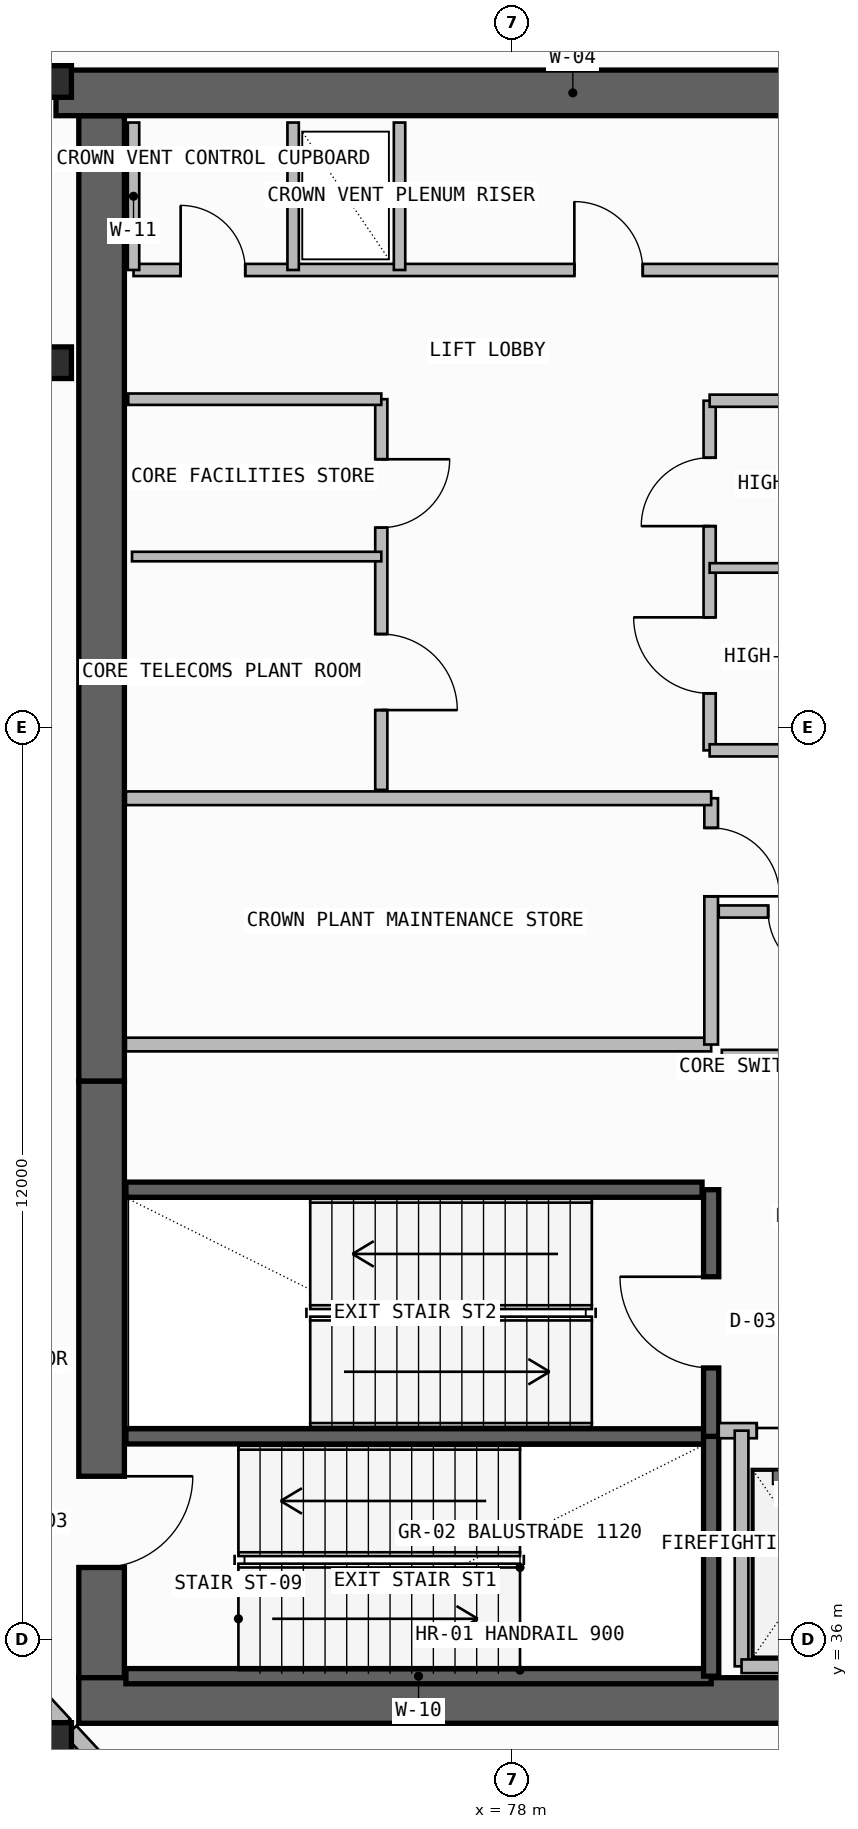
"""IFC4 building model, lengths in metres.
Left out: names, types, materials, properties, quantities, classifications, styles, units other than length and angle.
Written with IfcOpenShell. Run it as: python <this file> out.ifc"""

import sys

from ifc_helpers import new_model, si_unit, direction, frame, frame_2d, origin, origin_2d, place, context, subcontext, project, spatial, rectangle, i_section, extrude, element, fill, save


model = new_model("IFC4")
c1 = context("Model", 3, precision=1e-05, world=origin(), true_north=direction((0.0, 1.0)))
c2 = subcontext(c1, "Body", "Model", "MODEL_VIEW")
j1 = project(units=[si_unit("LENGTHUNIT", "METRE"), si_unit("PLANEANGLEUNIT", "RADIAN")], contexts=[c1])
p1 = place(None, origin())
s1 = spatial("IfcSite", under=j1, at=p1, CompositionType="ELEMENT")
p2 = place(p1, origin())
s2 = spatial("IfcBuilding", under=s1, at=p2, CompositionType="ELEMENT")
p3 = place(p2, frame((0.0, 0.0, 307.78)))
s3 = spatial("IfcBuildingStorey", under=s2, at=p3, CompositionType="ELEMENT", Elevation=307.78)
p4 = place(p3, frame((72.6, 35.5, -0.2), z_axis=(0.0, 0.0, 1.0), x_axis=(0.0, 1.0, 0.0)))
e1 = element("IfcWall", 1, at=p4, inside=s3, PredefinedType="SHEAR", context=c2, shape_type="SweptSolid", body=[
    extrude(rectangle(XDim=7.85, YDim=0.6, at=frame_2d((3.925, 0.0))), origin(), (0.0, 0.0, 1.0), 4.8),
])
p5 = place(p4, frame((1.45, 0.0, 0.2)))
e2 = element("IfcOpeningElement", 2, at=p5, cuts=e1, PredefinedType="OPENING", context=c2, shape_type="SweptSolid", body=[
    extrude(rectangle(XDim=1.2, YDim=2.2, at=frame_2d((0.6, 1.1))), frame((0.0, 0.31, 0.0), z_axis=(0.0, -1.0, 0.0), x_axis=(1.0, 0.0, 0.0)), (0.0, 0.0, 1.0), 0.62),
])
p6 = place(p3, frame((72.3, 35.2, -0.2), z_axis=(0.0, 0.0, 1.0), x_axis=(1.0, 0.0, 0.0)))
e3 = element("IfcWall", 3, at=p6, inside=s3, PredefinedType="SHEAR", context=c2, shape_type="SweptSolid", body=[
    extrude(rectangle(XDim=13.3, YDim=0.6, at=frame_2d((6.65, 0.0))), origin(), (0.0, 0.0, 1.0), 4.8),
])
p7 = place(p3, frame((72.6, 43.35, -0.2), z_axis=(0.0, 0.0, 1.0), x_axis=(0.0, 1.0, 0.0)))
e4 = element("IfcWall", 4, at=p7, inside=s3, PredefinedType="SHEAR", context=c2, shape_type="SweptSolid", body=[
    extrude(rectangle(XDim=12.7, YDim=0.6, at=frame_2d((6.35, 0.0))), origin(), (0.0, 0.0, 1.0), 4.8),
])
p8 = place(p3, frame((72.0, 56.35, -0.2), z_axis=(0.0, 0.0, 1.0), x_axis=(1.0, 0.0, 0.0)))
e5 = element("IfcWall", 5, at=p8, inside=s3, PredefinedType="SHEAR", context=c2, shape_type="SweptSolid", body=[
    extrude(rectangle(XDim=13.6, YDim=0.6, at=frame_2d((6.8, 0.0))), origin(), (0.0, 0.0, 1.0), 4.8),
])
for number, where, z_axis, x_axis in (
    (6, (72.0, 34.7, 0.0), (0.0, 0.0, 1.0), (1.0, 0.0, 0.0)),
    (7, (72.0, 52.8, 0.0), (0.0, 0.0, 1.0), (1.0, 0.0, 0.0)),
    (8, (72.0, 56.5, 0.0), (0.0, 0.0, 1.0), (1.0, 0.0, 0.0)),
):
    element("IfcColumn", number, at=place(p3, frame(where, z_axis=z_axis, x_axis=x_axis)), inside=s3, PredefinedType="COLUMN", context=c2, shape_type="SweptSolid", body=[
        extrude(i_section(OverallWidth=0.406, OverallDepth=0.416, WebThickness=0.03, FlangeThickness=0.048, FilletRadius=0.015, at=origin_2d()), origin(), (0.0, 0.0, 1.0), 4.8),
    ])
p9 = place(p3, frame((72.881, 34.058, 0.0), z_axis=(0.0, 0.0, 1.0), x_axis=(-0.678872530156, 0.734256145905, 0.0)))
e9 = element("IfcWall", 9, at=p9, inside=s3, PredefinedType="PARAPET", context=c2, shape_type="SweptSolid", body=[
    extrude(rectangle(XDim=1.01, YDim=0.2, at=frame_2d((0.505, 0.0))), origin(), (0.0, 0.0, 1.0), 1.15),
])
p10 = place(p3, frame((72.115, 34.887, 0.0), z_axis=(0.0, 0.0, 1.0), x_axis=(-0.678713667452, 0.734402994012, 0.0)))
e10 = element("IfcWall", 10, at=p10, inside=s3, PredefinedType="PARAPET", context=c2, shape_type="SweptSolid", body=[
    extrude(rectangle(XDim=1.052, YDim=0.2, at=frame_2d((0.526, 0.0))), origin(), (0.0, 0.0, 1.0), 1.15),
])
for number, where, z_axis, x_axis in (
    (11, (72.92, 35.52, -0.2), (0.0, 0.0, 1.0), (1.0, 0.0, 0.0)),
    (12, (72.92, 38.675, -0.2), (0.0, 0.0, 1.0), (1.0, 0.0, 0.0)),
):
    element("IfcWall", number, at=place(p3, frame(where, z_axis=z_axis, x_axis=x_axis)), inside=s3, PredefinedType="SOLIDWALL", context=c2, shape_type="SweptSolid", body=[
        extrude(rectangle(XDim=7.7, YDim=0.2, at=frame_2d((3.85, 0.0))), origin(), (0.0, 0.0, 1.0), 4.8),
    ])
p11 = place(p3, frame((80.62, 35.52, -0.2), z_axis=(0.0, 0.0, 1.0), x_axis=(0.0, 1.0, 0.0)))
e13 = element("IfcWall", 13, at=p11, inside=s3, PredefinedType="SOLIDWALL", context=c2, shape_type="SweptSolid", body=[
    extrude(rectangle(XDim=3.155, YDim=0.2, at=frame_2d((1.578, 0.0))), origin(), (0.0, 0.0, 1.0), 4.8),
])
p12 = place(p3, frame((80.62, 38.675, -0.2), z_axis=(0.0, 0.0, 1.0), x_axis=(0.0, 1.0, 0.0)))
e14 = element("IfcWall", 14, at=p12, inside=s3, PredefinedType="SOLIDWALL", context=c2, shape_type="SweptSolid", body=[
    extrude(rectangle(XDim=3.245, YDim=0.2, at=frame_2d((1.623, 0.0))), origin(), (0.0, 0.0, 1.0), 4.8),
])
p13 = place(p12, frame((0.9, 0.0, 0.2)))
e15 = element("IfcOpeningElement", 15, at=p13, cuts=e14, PredefinedType="OPENING", context=c2, shape_type="SweptSolid", body=[
    extrude(rectangle(XDim=1.2, YDim=2.2, at=frame_2d((0.6, 1.1))), frame((0.0, 0.11, 0.0), z_axis=(0.0, -1.0, 0.0), x_axis=(1.0, 0.0, 0.0)), (0.0, 0.0, 1.0), 0.22),
])
p14 = place(p3, frame((80.72, 38.75, 0.0), z_axis=(0.0, 0.0, 1.0), x_axis=(1.0, 0.0, 0.0)))
e16 = element("IfcWall", 16, at=p14, inside=s3, PredefinedType="SOLIDWALL", context=c2, shape_type="SweptSolid", body=[
    extrude(rectangle(XDim=4.26, YDim=0.2, at=frame_2d((2.13, 0.0))), origin(), (0.0, 0.0, 1.0), 4.6),
])
p15 = place(p14, frame((0.5, 0.0, 0.0)))
e17 = element("IfcOpeningElement", 17, at=p15, cuts=e16, PredefinedType="OPENING", context=c2, shape_type="SweptSolid", body=[
    extrude(rectangle(XDim=1.3, YDim=2.3, at=frame_2d((0.65, 1.15))), frame((0.0, 0.11, 0.0), z_axis=(0.0, -1.0, 0.0), x_axis=(1.0, 0.0, 0.0)), (0.0, 0.0, 1.0), 0.22),
])
p16 = place(p14, frame((2.45, 0.0, 0.0)))
e18 = element("IfcOpeningElement", 18, at=p16, cuts=e16, PredefinedType="OPENING", context=c2, shape_type="SweptSolid", body=[
    extrude(rectangle(XDim=1.3, YDim=2.3, at=frame_2d((0.65, 1.15))), frame((0.0, 0.11, 0.0), z_axis=(0.0, -1.0, 0.0), x_axis=(1.0, 0.0, 0.0)), (0.0, 0.0, 1.0), 0.22),
])
p17 = place(p3, frame((81.02, 35.65, 0.0), z_axis=(0.0, 0.0, 1.0), x_axis=(0.0, 1.0, 0.0)))
e19 = element("IfcWall", 19, at=p17, inside=s3, PredefinedType="SOLIDWALL", context=c2, shape_type="SweptSolid", body=[
    extrude(rectangle(XDim=3.1, YDim=0.18, at=frame_2d((1.55, 0.0))), origin(), (0.0, 0.0, 1.0), 4.6),
])
p18 = place(p3, frame((81.02, 35.65, 0.0), z_axis=(0.0, 0.0, 1.0), x_axis=(1.0, 0.0, 0.0)))
e20 = element("IfcWall", 20, at=p18, inside=s3, PredefinedType="SOLIDWALL", context=c2, shape_type="SweptSolid", body=[
    extrude(rectangle(XDim=3.93, YDim=0.18, at=frame_2d((1.965, 0.0))), origin(), (0.0, 0.0, 1.0), 4.6),
])
p19 = place(p3, frame((72.92, 41.92, -0.2), z_axis=(0.0, 0.0, 1.0), x_axis=(1.0, 0.0, 0.0)))
e21 = element("IfcWall", 21, at=p19, inside=s3, PredefinedType="SOLIDWALL", context=c2, shape_type="SweptSolid", body=[
    extrude(rectangle(XDim=7.58, YDim=0.2, at=frame_2d((3.79, 0.0))), origin(), (0.0, 0.0, 1.0), 4.8),
])
p20 = place(p3, frame((72.92, 43.83, 0.0), z_axis=(0.0, 0.0, 1.0), x_axis=(1.0, 0.0, 0.0)))
e22 = element("IfcWall", 22, at=p20, inside=s3, PredefinedType="PLUMBINGWALL", context=c2, shape_type="SweptSolid", body=[
    extrude(rectangle(XDim=7.7, YDim=0.18, at=frame_2d((3.85, 0.0))), origin(), (0.0, 0.0, 1.0), 4.6),
])
p21 = place(p3, frame((80.62, 43.83, 0.0), z_axis=(0.0, 0.0, 1.0), x_axis=(0.0, 1.0, 0.0)))
e23 = element("IfcWall", 23, at=p21, inside=s3, PredefinedType="PLUMBINGWALL", context=c2, shape_type="SweptSolid", body=[
    extrude(rectangle(XDim=3.24, YDim=0.18, at=frame_2d((1.62, 0.0))), origin(), (0.0, 0.0, 1.0), 4.6),
])
p22 = place(p21, frame((1.95, 0.0, 0.0)))
e24 = element("IfcOpeningElement", 24, at=p22, cuts=e23, PredefinedType="OPENING", context=c2, shape_type="SweptSolid", body=[
    extrude(rectangle(XDim=0.9, YDim=2.1, at=frame_2d((0.45, 1.05))), frame((0.0, 0.1, 0.0), z_axis=(0.0, -1.0, 0.0), x_axis=(1.0, 0.0, 0.0)), (0.0, 0.0, 1.0), 0.2),
])
p23 = place(p3, frame((72.92, 47.07, 0.0), z_axis=(0.0, 0.0, 1.0), x_axis=(1.0, 0.0, 0.0)))
e25 = element("IfcWall", 25, at=p23, inside=s3, PredefinedType="PLUMBINGWALL", context=c2, shape_type="SweptSolid", body=[
    extrude(rectangle(XDim=7.7, YDim=0.18, at=frame_2d((3.85, 0.0))), origin(), (0.0, 0.0, 1.0), 4.6),
])
p24 = place(p3, frame((80.72, 45.58, 0.0), z_axis=(0.0, 0.0, 1.0), x_axis=(1.0, 0.0, 0.0)))
e26 = element("IfcWall", 26, at=p24, inside=s3, PredefinedType="PLUMBINGWALL", context=c2, shape_type="SweptSolid", body=[
    extrude(rectangle(XDim=4.23, YDim=0.16, at=frame_2d((2.115, 0.0))), origin(), (0.0, 0.0, 1.0), 4.6),
])
p25 = place(p24, frame((0.65, 0.0, 0.0)))
e27 = element("IfcOpeningElement", 27, at=p25, cuts=e26, PredefinedType="OPENING", context=c2, shape_type="SweptSolid", body=[
    extrude(rectangle(XDim=0.85, YDim=2.05, at=frame_2d((0.425, 1.025))), frame((0.0, 0.09, 0.0), z_axis=(0.0, -1.0, 0.0), x_axis=(1.0, 0.0, 0.0)), (0.0, 0.0, 1.0), 0.18),
])
p26 = place(p24, frame((2.95, 0.0, 0.0)))
e28 = element("IfcOpeningElement", 28, at=p26, cuts=e26, PredefinedType="OPENING", context=c2, shape_type="SweptSolid", body=[
    extrude(rectangle(XDim=0.85, YDim=2.05, at=frame_2d((0.425, 1.025))), frame((0.0, 0.09, 0.0), z_axis=(0.0, -1.0, 0.0), x_axis=(1.0, 0.0, 0.0)), (0.0, 0.0, 1.0), 0.18),
])
p27 = place(p3, frame((80.76, 43.68, 0.0), z_axis=(0.0, 0.0, 1.0), x_axis=(1.0, 0.0, 0.0)))
e29 = element("IfcWall", 29, at=p27, inside=s3, PredefinedType="PLUMBINGWALL", context=c2, shape_type="SweptSolid", body=[
    extrude(rectangle(XDim=4.19, YDim=0.16, at=frame_2d((2.095, 0.0))), origin(), (0.0, 0.0, 1.0), 4.6),
])
p28 = place(p3, frame((76.28, 47.18, 0.0), z_axis=(0.0, 0.0, 1.0), x_axis=(0.0, 1.0, 0.0)))
e30 = element("IfcWall", 30, at=p28, inside=s3, PredefinedType="SOLIDWALL", context=c2, shape_type="SweptSolid", body=[
    extrude(rectangle(XDim=5.14, YDim=0.16, at=frame_2d((2.57, 0.0))), origin(), (0.0, 0.0, 1.0), 4.6),
])
p29 = place(p28, frame((1.05, 0.0, 0.0)))
e31 = element("IfcOpeningElement", 31, at=p29, cuts=e30, PredefinedType="OPENING", context=c2, shape_type="SweptSolid", body=[
    extrude(rectangle(XDim=1.0, YDim=2.2, at=frame_2d((0.5, 1.1))), frame((0.0, 0.09, 0.0), z_axis=(0.0, -1.0, 0.0), x_axis=(1.0, 0.0, 0.0)), (0.0, 0.0, 1.0), 0.18),
])
p30 = place(p28, frame((3.45, 0.0, 0.0)))
e32 = element("IfcOpeningElement", 32, at=p30, cuts=e30, PredefinedType="OPENING", context=c2, shape_type="SweptSolid", body=[
    extrude(rectangle(XDim=0.9, YDim=2.1, at=frame_2d((0.45, 1.05))), frame((0.0, 0.09, 0.0), z_axis=(0.0, -1.0, 0.0), x_axis=(1.0, 0.0, 0.0)), (0.0, 0.0, 1.0), 0.18),
])
p31 = place(p3, frame((72.95, 52.32, 0.0), z_axis=(0.0, 0.0, 1.0), x_axis=(1.0, 0.0, 0.0)))
e33 = element("IfcWall", 33, at=p31, inside=s3, PredefinedType="SOLIDWALL", context=c2, shape_type="SweptSolid", body=[
    extrude(rectangle(XDim=3.33, YDim=0.15, at=frame_2d((1.665, 0.0))), origin(), (0.0, 0.0, 1.0), 4.6),
])
p32 = place(p3, frame((73.0, 50.25, 0.0), z_axis=(0.0, 0.0, 1.0), x_axis=(1.0, 0.0, 0.0)))
e34 = element("IfcWall", 34, at=p32, inside=s3, PredefinedType="PARTITIONING", context=c2, shape_type="SweptSolid", body=[
    extrude(rectangle(XDim=3.28, YDim=0.125, at=frame_2d((1.64, 0.0))), origin(), (0.0, 0.0, 1.0), 4.6),
])
p33 = place(p3, frame((80.6, 47.7, 0.0), z_axis=(0.0, 0.0, 1.0), x_axis=(0.0, 1.0, 0.0)))
e35 = element("IfcWall", 35, at=p33, inside=s3, PredefinedType="SOLIDWALL", context=c2, shape_type="SweptSolid", body=[
    extrude(rectangle(XDim=4.6, YDim=0.16, at=frame_2d((2.3, 0.0))), origin(), (0.0, 0.0, 1.0), 4.6),
])
p34 = place(p33, frame((0.75, 0.0, 0.0)))
e36 = element("IfcOpeningElement", 36, at=p34, cuts=e35, PredefinedType="OPENING", context=c2, shape_type="SweptSolid", body=[
    extrude(rectangle(XDim=1.0, YDim=2.2, at=frame_2d((0.5, 1.1))), frame((0.0, 0.09, 0.0), z_axis=(0.0, -1.0, 0.0), x_axis=(1.0, 0.0, 0.0)), (0.0, 0.0, 1.0), 0.18),
])
p35 = place(p33, frame((2.95, 0.0, 0.0)))
e37 = element("IfcOpeningElement", 37, at=p35, cuts=e35, PredefinedType="OPENING", context=c2, shape_type="SweptSolid", body=[
    extrude(rectangle(XDim=0.9, YDim=2.1, at=frame_2d((0.45, 1.05))), frame((0.0, 0.09, 0.0), z_axis=(0.0, -1.0, 0.0), x_axis=(1.0, 0.0, 0.0)), (0.0, 0.0, 1.0), 0.18),
])
p36 = place(p3, frame((80.6, 47.7, 0.0), z_axis=(0.0, 0.0, 1.0), x_axis=(1.0, 0.0, 0.0)))
e38 = element("IfcWall", 38, at=p36, inside=s3, PredefinedType="SOLIDWALL", context=c2, shape_type="SweptSolid", body=[
    extrude(rectangle(XDim=4.4, YDim=0.16, at=frame_2d((2.2, 0.0))), origin(), (0.0, 0.0, 1.0), 4.6),
])
p37 = place(p3, frame((80.6, 52.3, 0.0), z_axis=(0.0, 0.0, 1.0), x_axis=(1.0, 0.0, 0.0)))
e39 = element("IfcWall", 39, at=p37, inside=s3, PredefinedType="SOLIDWALL", context=c2, shape_type="SweptSolid", body=[
    extrude(rectangle(XDim=4.22, YDim=0.16, at=frame_2d((2.11, 0.0))), origin(), (0.0, 0.0, 1.0), 4.6),
])
p38 = place(p3, frame((80.6, 50.1, 0.0), z_axis=(0.0, 0.0, 1.0), x_axis=(1.0, 0.0, 0.0)))
e40 = element("IfcWall", 40, at=p38, inside=s3, PredefinedType="PARTITIONING", context=c2, shape_type="SweptSolid", body=[
    extrude(rectangle(XDim=4.22, YDim=0.125, at=frame_2d((2.11, 0.0))), origin(), (0.0, 0.0, 1.0), 4.6),
])
p39 = place(p3, frame((73.02, 54.02, 0.0), z_axis=(0.0, 0.0, 1.0), x_axis=(1.0, 0.0, 0.0)))
e41 = element("IfcWall", 41, at=p39, inside=s3, PredefinedType="SOLIDWALL", context=c2, shape_type="SweptSolid", body=[
    extrude(rectangle(XDim=12.08, YDim=0.16, at=frame_2d((6.04, 0.0))), origin(), (0.0, 0.0, 1.0), 4.6),
])
p40 = place(p39, frame((0.62, 0.0, 0.0)))
e42 = element("IfcOpeningElement", 42, at=p40, cuts=e41, PredefinedType="OPENING", context=c2, shape_type="SweptSolid", body=[
    extrude(rectangle(XDim=0.85, YDim=2.05, at=frame_2d((0.425, 1.025))), frame((0.0, 0.09, 0.0), z_axis=(0.0, -1.0, 0.0), x_axis=(1.0, 0.0, 0.0)), (0.0, 0.0, 1.0), 0.18),
])
p41 = place(p39, frame((5.8, 0.0, 0.0)))
e43 = element("IfcOpeningElement", 43, at=p41, cuts=e41, PredefinedType="OPENING", context=c2, shape_type="SweptSolid", body=[
    extrude(rectangle(XDim=0.9, YDim=2.1, at=frame_2d((0.45, 1.05))), frame((0.0, 0.09, 0.0), z_axis=(0.0, -1.0, 0.0), x_axis=(1.0, 0.0, 0.0)), (0.0, 0.0, 1.0), 0.18),
])
for number, where, z_axis, x_axis in (
    (44, (73.02, 54.02, 0.0), (0.0, 0.0, 1.0), (0.0, 1.0, 0.0)),
    (45, (75.12, 54.02, 0.0), (0.0, 0.0, 1.0), (0.0, 1.0, 0.0)),
    (46, (76.52, 54.02, 0.0), (0.0, 0.0, 1.0), (0.0, 1.0, 0.0)),
):
    element("IfcWall", number, at=place(p3, frame(where, z_axis=z_axis, x_axis=x_axis)), inside=s3, PredefinedType="PLUMBINGWALL", context=c2, shape_type="SweptSolid", body=[
        extrude(rectangle(XDim=1.94, YDim=0.15, at=frame_2d((0.97, 0.0))), origin(), (0.0, 0.0, 1.0), 4.6),
    ])
p42 = place(p5, frame((1.2, 0.0, 0.0), z_axis=(0.0, 0.0, 1.0), x_axis=(-1.0, 0.0, 0.0)))
e47 = element("IfcDoor", 47, at=p42, inside=s3, OperationType="SINGLE_SWING_LEFT", PredefinedType="USERDEFINED", context=c2, shape_type="SweptSolid", body=[
    extrude(rectangle(XDim=1.2, YDim=2.2, at=frame_2d((0.6, 1.1))), frame((0.0, 0.025, 0.0), z_axis=(0.0, -1.0, 0.0), x_axis=(1.0, 0.0, 0.0)), (0.0, 0.0, 1.0), 0.05),
])
fill(e2, e47)
p43 = place(p13, origin())
e48 = element("IfcDoor", 48, at=p43, inside=s3, OperationType="SINGLE_SWING_RIGHT", PredefinedType="USERDEFINED", context=c2, shape_type="SweptSolid", body=[
    extrude(rectangle(XDim=1.2, YDim=2.2, at=frame_2d((0.6, 1.1))), frame((0.0, 0.025, 0.0), z_axis=(0.0, -1.0, 0.0), x_axis=(1.0, 0.0, 0.0)), (0.0, 0.0, 1.0), 0.05),
])
fill(e15, e48)
p44 = place(p15, origin())
e49 = element("IfcDoor", 49, at=p44, inside=s3, OperationType="DOUBLE_DOOR_SLIDING", PredefinedType="DOOR", context=c2, shape_type="SweptSolid", body=[
    extrude(rectangle(XDim=1.3, YDim=2.3, at=frame_2d((0.65, 1.15))), frame((0.0, 0.025, 0.0), z_axis=(0.0, -1.0, 0.0), x_axis=(1.0, 0.0, 0.0)), (0.0, 0.0, 1.0), 0.05),
])
fill(e17, e49)
p45 = place(p22, frame((0.9, 0.0, 0.0), z_axis=(0.0, 0.0, 1.0), x_axis=(-1.0, 0.0, 0.0)))
e50 = element("IfcDoor", 50, at=p45, inside=s3, OperationType="SINGLE_SWING_RIGHT", PredefinedType="DOOR", context=c2, shape_type="SweptSolid", body=[
    extrude(rectangle(XDim=0.9, YDim=2.1, at=frame_2d((0.45, 1.05))), frame((0.0, 0.025, 0.0), z_axis=(0.0, -1.0, 0.0), x_axis=(1.0, 0.0, 0.0)), (0.0, 0.0, 1.0), 0.05),
])
fill(e24, e50)
p46 = place(p25, frame((0.85, 0.0, 0.0), z_axis=(0.0, 0.0, 1.0), x_axis=(-1.0, 0.0, 0.0)))
e51 = element("IfcDoor", 51, at=p46, inside=s3, OperationType="SINGLE_SWING_LEFT", PredefinedType="DOOR", context=c2, shape_type="SweptSolid", body=[
    extrude(rectangle(XDim=0.85, YDim=2.05, at=frame_2d((0.425, 1.025))), frame((0.0, 0.025, 0.0), z_axis=(0.0, -1.0, 0.0), x_axis=(1.0, 0.0, 0.0)), (0.0, 0.0, 1.0), 0.05),
])
fill(e27, e51)
p47 = place(p29, frame((1.0, 0.0, 0.0), z_axis=(0.0, 0.0, 1.0), x_axis=(-1.0, 0.0, 0.0)))
e52 = element("IfcDoor", 52, at=p47, inside=s3, OperationType="SINGLE_SWING_RIGHT", PredefinedType="DOOR", context=c2, shape_type="SweptSolid", body=[
    extrude(rectangle(XDim=1.0, YDim=2.2, at=frame_2d((0.5, 1.1))), frame((0.0, 0.025, 0.0), z_axis=(0.0, -1.0, 0.0), x_axis=(1.0, 0.0, 0.0)), (0.0, 0.0, 1.0), 0.05),
])
fill(e31, e52)
p48 = place(p30, frame((0.9, 0.0, 0.0), z_axis=(0.0, 0.0, 1.0), x_axis=(-1.0, 0.0, 0.0)))
e53 = element("IfcDoor", 53, at=p48, inside=s3, OperationType="SINGLE_SWING_LEFT", PredefinedType="DOOR", context=c2, shape_type="SweptSolid", body=[
    extrude(rectangle(XDim=0.9, YDim=2.1, at=frame_2d((0.45, 1.05))), frame((0.0, 0.025, 0.0), z_axis=(0.0, -1.0, 0.0), x_axis=(1.0, 0.0, 0.0)), (0.0, 0.0, 1.0), 0.05),
])
fill(e32, e53)
p49 = place(p34, origin())
e54 = element("IfcDoor", 54, at=p49, inside=s3, OperationType="SINGLE_SWING_RIGHT", PredefinedType="DOOR", context=c2, shape_type="SweptSolid", body=[
    extrude(rectangle(XDim=1.0, YDim=2.2, at=frame_2d((0.5, 1.1))), frame((0.0, 0.025, 0.0), z_axis=(0.0, -1.0, 0.0), x_axis=(1.0, 0.0, 0.0)), (0.0, 0.0, 1.0), 0.05),
])
fill(e36, e54)
p50 = place(p35, origin())
e55 = element("IfcDoor", 55, at=p50, inside=s3, OperationType="SINGLE_SWING_LEFT", PredefinedType="DOOR", context=c2, shape_type="SweptSolid", body=[
    extrude(rectangle(XDim=0.9, YDim=2.1, at=frame_2d((0.45, 1.05))), frame((0.0, 0.025, 0.0), z_axis=(0.0, -1.0, 0.0), x_axis=(1.0, 0.0, 0.0)), (0.0, 0.0, 1.0), 0.05),
])
fill(e37, e55)
p51 = place(p40, origin())
e56 = element("IfcDoor", 56, at=p51, inside=s3, OperationType="SINGLE_SWING_LEFT", PredefinedType="DOOR", context=c2, shape_type="SweptSolid", body=[
    extrude(rectangle(XDim=0.85, YDim=2.05, at=frame_2d((0.425, 1.025))), frame((0.0, 0.025, 0.0), z_axis=(0.0, -1.0, 0.0), x_axis=(1.0, 0.0, 0.0)), (0.0, 0.0, 1.0), 0.05),
])
fill(e42, e56)
p52 = place(p41, origin())
e57 = element("IfcDoor", 57, at=p52, inside=s3, OperationType="SINGLE_SWING_LEFT", PredefinedType="DOOR", context=c2, shape_type="SweptSolid", body=[
    extrude(rectangle(XDim=0.9, YDim=2.1, at=frame_2d((0.45, 1.05))), frame((0.0, 0.025, 0.0), z_axis=(0.0, -1.0, 0.0), x_axis=(1.0, 0.0, 0.0)), (0.0, 0.0, 1.0), 0.05),
])
fill(e43, e57)
save(model, sys.argv[1])
